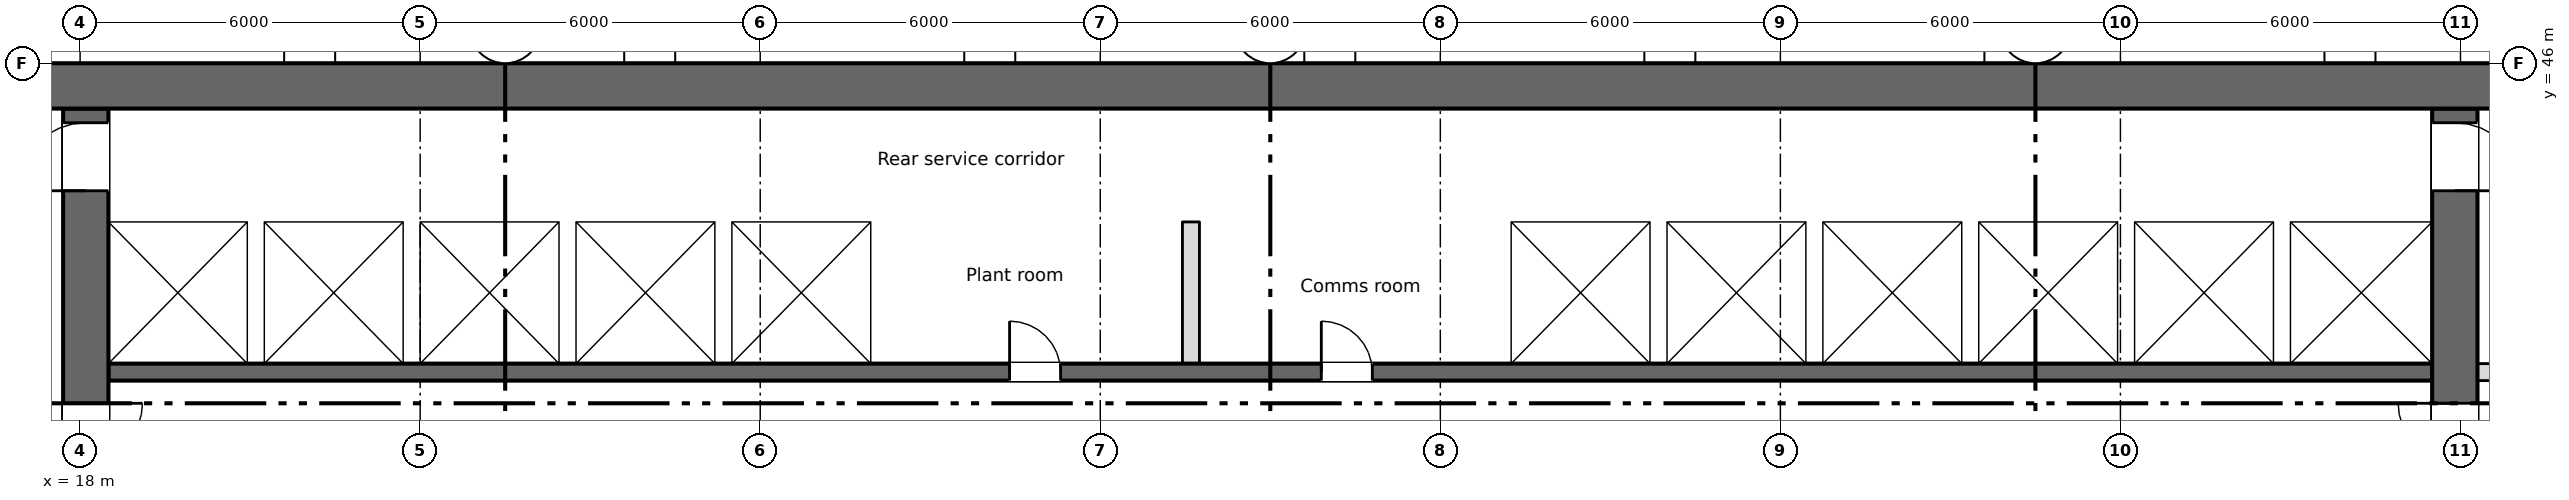
"""IFC4 building model, lengths in metres.
Left out: names, types, materials, properties, quantities, classifications, styles, units other than length and angle.
Written with IfcOpenShell. Run it as: python <this file> out.ifc"""

import sys

from ifc_helpers import new_model, si_unit, direction, frame, frame_2d, origin, place, context, subcontext, project, spatial, rectangle, extrude, element, fill, save


model = new_model("IFC4")
c1 = context("Model", 3, precision=1e-05, world=origin(), true_north=direction((0.0, 1.0)))
c2 = subcontext(c1, "Body", "Model", "MODEL_VIEW")
j1 = project(units=[si_unit("LENGTHUNIT", "METRE"), si_unit("PLANEANGLEUNIT", "RADIAN")], contexts=[c1])
p1 = place(None, origin())
s1 = spatial("IfcSite", under=j1, at=p1, CompositionType="ELEMENT")
p2 = place(p1, origin())
s2 = spatial("IfcBuilding", under=s1, at=p2, CompositionType="ELEMENT")
p3 = place(p2, frame((0.0, 0.0, 95.0)))
s3 = spatial("IfcBuildingStorey", under=s2, at=p3, CompositionType="ELEMENT", Elevation=95.0)
p4 = place(p3, frame((5.55, 45.6, 0.0), z_axis=(0.0, 0.0, 1.0), x_axis=(1.0, 0.0, 0.0)))
e1 = element("IfcWall", 1, at=p4, inside=s3, PredefinedType="SHEAR", context=c2, shape_type="SweptSolid", body=[
    extrude(rectangle(XDim=60.9, YDim=0.8, at=frame_2d((30.45, 0.0))), origin(), (0.0, 0.0, 1.0), 3.35),
])
p5 = place(p4, frame((1.2, 0.0, 0.6)))
e2 = element("IfcOpeningElement", 2, at=p5, cuts=e1, PredefinedType="OPENING", context=c2, shape_type="SweptSolid", body=[
    extrude(rectangle(XDim=0.6, YDim=2.4, at=frame_2d((0.3, 1.2))), frame((0.0, 0.41, 0.0), z_axis=(0.0, -1.0, 0.0), x_axis=(1.0, 0.0, 0.0)), (0.0, 0.0, 1.0), 0.82),
])
p6 = place(p4, frame((7.2, 0.0, 0.6)))
e3 = element("IfcOpeningElement", 3, at=p6, cuts=e1, PredefinedType="OPENING", context=c2, shape_type="SweptSolid", body=[
    extrude(rectangle(XDim=0.6, YDim=2.4, at=frame_2d((0.3, 1.2))), frame((0.0, 0.41, 0.0), z_axis=(0.0, -1.0, 0.0), x_axis=(1.0, 0.0, 0.0)), (0.0, 0.0, 1.0), 0.82),
])
p7 = place(p4, frame((55.2, 0.0, 0.6)))
e4 = element("IfcOpeningElement", 4, at=p7, cuts=e1, PredefinedType="OPENING", context=c2, shape_type="SweptSolid", body=[
    extrude(rectangle(XDim=0.6, YDim=2.4, at=frame_2d((0.3, 1.2))), frame((0.0, 0.41, 0.0), z_axis=(0.0, -1.0, 0.0), x_axis=(1.0, 0.0, 0.0)), (0.0, 0.0, 1.0), 0.82),
])
p8 = place(p3, frame((18.1, 28.4, 0.0), z_axis=(0.0, 0.0, 1.0), x_axis=(0.0, 1.0, 0.0)))
e5 = element("IfcWall", 5, at=p8, inside=s3, PredefinedType="SHEAR", context=c2, shape_type="SweptSolid", body=[
    extrude(rectangle(XDim=16.8, YDim=0.8, at=frame_2d((8.4, 0.0))), origin(), (0.0, 0.0, 1.0), 3.35),
])
p9 = place(p8, frame((9.6, 0.0, 0.0)))
e6 = element("IfcOpeningElement", 6, at=p9, cuts=e5, PredefinedType="OPENING", context=c2, shape_type="SweptSolid", body=[
    extrude(rectangle(XDim=2.0, YDim=2.1, at=frame_2d((1.0, 1.05))), frame((0.0, 0.41, 0.0), z_axis=(0.0, -1.0, 0.0), x_axis=(1.0, 0.0, 0.0)), (0.0, 0.0, 1.0), 0.82),
])
p10 = place(p8, frame((15.35, 0.0, 0.0)))
e7 = element("IfcOpeningElement", 7, at=p10, cuts=e5, PredefinedType="OPENING", context=c2, shape_type="SweptSolid", body=[
    extrude(rectangle(XDim=1.2, YDim=2.1, at=frame_2d((0.6, 1.05))), frame((0.0, 0.41, 0.0), z_axis=(0.0, -1.0, 0.0), x_axis=(1.0, 0.0, 0.0)), (0.0, 0.0, 1.0), 0.82),
])
p11 = place(p3, frame((59.9, 28.4, 0.0), z_axis=(0.0, 0.0, 1.0), x_axis=(0.0, 1.0, 0.0)))
e8 = element("IfcWall", 8, at=p11, inside=s3, PredefinedType="SHEAR", context=c2, shape_type="SweptSolid", body=[
    extrude(rectangle(XDim=16.8, YDim=0.8, at=frame_2d((8.4, 0.0))), origin(), (0.0, 0.0, 1.0), 3.35),
])
p12 = place(p11, frame((9.6, 0.0, 0.0)))
e9 = element("IfcOpeningElement", 9, at=p12, cuts=e8, PredefinedType="OPENING", context=c2, shape_type="SweptSolid", body=[
    extrude(rectangle(XDim=2.0, YDim=2.1, at=frame_2d((1.0, 1.05))), frame((0.0, 0.41, 0.0), z_axis=(0.0, -1.0, 0.0), x_axis=(1.0, 0.0, 0.0)), (0.0, 0.0, 1.0), 0.82),
])
p13 = place(p11, frame((15.35, 0.0, 0.0)))
e10 = element("IfcOpeningElement", 10, at=p13, cuts=e8, PredefinedType="OPENING", context=c2, shape_type="SweptSolid", body=[
    extrude(rectangle(XDim=1.2, YDim=2.1, at=frame_2d((0.6, 1.05))), frame((0.0, 0.41, 0.0), z_axis=(0.0, -1.0, 0.0), x_axis=(1.0, 0.0, 0.0)), (0.0, 0.0, 1.0), 0.82),
])
p14 = place(p3, frame((18.5, 40.55, 0.0), z_axis=(0.0, 0.0, 1.0), x_axis=(1.0, 0.0, 0.0)))
e11 = element("IfcWall", 11, at=p14, inside=s3, PredefinedType="SHEAR", context=c2, shape_type="SweptSolid", body=[
    extrude(rectangle(XDim=41.0, YDim=0.3, at=frame_2d((20.5, 0.0))), origin(), (0.0, 0.0, 1.0), 3.35),
])
p15 = place(p14, frame((15.9, 0.0, 0.0)))
e12 = element("IfcOpeningElement", 12, at=p15, cuts=e11, PredefinedType="OPENING", context=c2, shape_type="SweptSolid", body=[
    extrude(rectangle(XDim=0.9, YDim=2.1, at=frame_2d((0.45, 1.05))), frame((0.0, 0.16, 0.0), z_axis=(0.0, -1.0, 0.0), x_axis=(1.0, 0.0, 0.0)), (0.0, 0.0, 1.0), 0.32),
])
p16 = place(p14, frame((21.4, 0.0, 0.0)))
e13 = element("IfcOpeningElement", 13, at=p16, cuts=e11, PredefinedType="OPENING", context=c2, shape_type="SweptSolid", body=[
    extrude(rectangle(XDim=0.9, YDim=2.1, at=frame_2d((0.45, 1.05))), frame((0.0, 0.16, 0.0), z_axis=(0.0, -1.0, 0.0), x_axis=(1.0, 0.0, 0.0)), (0.0, 0.0, 1.0), 0.32),
])
p17 = place(p14, frame((6.175, 0.0, 0.0)))
e14 = element("IfcOpeningElement", 14, at=p17, cuts=e11, PredefinedType="OPENING", context=c2, shape_type="SweptSolid", body=[
    extrude(rectangle(XDim=1.1, YDim=2.1, at=frame_2d((0.55, 1.05))), frame((0.0, 0.16, 0.0), z_axis=(0.0, -1.0, 0.0), x_axis=(1.0, 0.0, 0.0)), (0.0, 0.0, 1.0), 0.32),
])
p18 = place(p14, frame((8.925, 0.0, 0.0)))
e15 = element("IfcOpeningElement", 15, at=p18, cuts=e11, PredefinedType="OPENING", context=c2, shape_type="SweptSolid", body=[
    extrude(rectangle(XDim=1.1, YDim=2.1, at=frame_2d((0.55, 1.05))), frame((0.0, 0.16, 0.0), z_axis=(0.0, -1.0, 0.0), x_axis=(1.0, 0.0, 0.0)), (0.0, 0.0, 1.0), 0.32),
])
p19 = place(p14, frame((11.675, 0.0, 0.0)))
e16 = element("IfcOpeningElement", 16, at=p19, cuts=e11, PredefinedType="OPENING", context=c2, shape_type="SweptSolid", body=[
    extrude(rectangle(XDim=1.1, YDim=2.1, at=frame_2d((0.55, 1.05))), frame((0.0, 0.16, 0.0), z_axis=(0.0, -1.0, 0.0), x_axis=(1.0, 0.0, 0.0)), (0.0, 0.0, 1.0), 0.32),
])
p20 = place(p14, frame((30.925, 0.0, 0.0)))
e17 = element("IfcOpeningElement", 17, at=p20, cuts=e11, PredefinedType="OPENING", context=c2, shape_type="SweptSolid", body=[
    extrude(rectangle(XDim=1.1, YDim=2.1, at=frame_2d((0.55, 1.05))), frame((0.0, 0.16, 0.0), z_axis=(0.0, -1.0, 0.0), x_axis=(1.0, 0.0, 0.0)), (0.0, 0.0, 1.0), 0.32),
])
p21 = place(p14, frame((33.675, 0.0, 0.0)))
e18 = element("IfcOpeningElement", 18, at=p21, cuts=e11, PredefinedType="OPENING", context=c2, shape_type="SweptSolid", body=[
    extrude(rectangle(XDim=1.1, YDim=2.1, at=frame_2d((0.55, 1.05))), frame((0.0, 0.16, 0.0), z_axis=(0.0, -1.0, 0.0), x_axis=(1.0, 0.0, 0.0)), (0.0, 0.0, 1.0), 0.32),
])
p22 = place(p14, frame((36.375, 0.0, 0.0)))
e19 = element("IfcOpeningElement", 19, at=p22, cuts=e11, PredefinedType="OPENING", context=c2, shape_type="SweptSolid", body=[
    extrude(rectangle(XDim=1.2, YDim=2.1, at=frame_2d((0.6, 1.05))), frame((0.0, 0.16, 0.0), z_axis=(0.0, -1.0, 0.0), x_axis=(1.0, 0.0, 0.0)), (0.0, 0.0, 1.0), 0.32),
])
p23 = place(p14, frame((39.15, 0.0, 0.0)))
e20 = element("IfcOpeningElement", 20, at=p23, cuts=e11, PredefinedType="OPENING", context=c2, shape_type="SweptSolid", body=[
    extrude(rectangle(XDim=1.2, YDim=2.1, at=frame_2d((0.6, 1.05))), frame((0.0, 0.16, 0.0), z_axis=(0.0, -1.0, 0.0), x_axis=(1.0, 0.0, 0.0)), (0.0, 0.0, 1.0), 0.32),
])
p24 = place(p3, frame((18.5, 43.35, 0.0), z_axis=(0.0, 0.0, 1.0), x_axis=(1.0, 0.0, 0.0)))
e21 = element("IfcWall", 21, at=p24, inside=s3, PredefinedType="SHEAR", context=c2, shape_type="SweptSolid", body=[
    extrude(rectangle(XDim=41.0, YDim=0.3, at=frame_2d((20.5, 0.0))), origin(), (0.0, 0.0, 1.0), 3.35),
])
p25 = place(p3, frame((60.3, 40.55, 0.0), z_axis=(0.0, 0.0, 1.0), x_axis=(1.0, 0.0, 0.0)))
e22 = element("IfcWall", 22, at=p25, inside=s3, PredefinedType="PARTITIONING", context=c2, shape_type="SweptSolid", body=[
    extrude(rectangle(XDim=2.4, YDim=0.3, at=frame_2d((1.2, 0.0))), origin(), (0.0, 0.0, 1.0), 3.35),
])
p26 = place(p25, frame((0.675, 0.0, 0.0)))
e23 = element("IfcOpeningElement", 23, at=p26, cuts=e22, PredefinedType="OPENING", context=c2, shape_type="SweptSolid", body=[
    extrude(rectangle(XDim=0.9, YDim=2.1, at=frame_2d((0.45, 1.05))), frame((0.0, 0.16, 0.0), z_axis=(0.0, -1.0, 0.0), x_axis=(1.0, 0.0, 0.0)), (0.0, 0.0, 1.0), 0.32),
])
for number, where, z_axis, x_axis in (
    (24, (21.1, 40.7, 0.0), (0.0, 0.0, 1.0), (0.0, 1.0, 0.0)),
    (25, (23.85, 40.7, 0.0), (0.0, 0.0, 1.0), (0.0, 1.0, 0.0)),
    (26, (26.6, 40.7, 0.0), (0.0, 0.0, 1.0), (0.0, 1.0, 0.0)),
    (27, (29.35, 40.7, 0.0), (0.0, 0.0, 1.0), (0.0, 1.0, 0.0)),
    (28, (32.1, 40.7, 0.0), (0.0, 0.0, 1.0), (0.0, 1.0, 0.0)),
    (29, (43.1, 40.7, 0.0), (0.0, 0.0, 1.0), (0.0, 1.0, 0.0)),
    (30, (45.85, 40.7, 0.0), (0.0, 0.0, 1.0), (0.0, 1.0, 0.0)),
    (31, (48.6, 40.7, 0.0), (0.0, 0.0, 1.0), (0.0, 1.0, 0.0)),
    (32, (51.35, 40.7, 0.0), (0.0, 0.0, 1.0), (0.0, 1.0, 0.0)),
    (33, (54.1, 40.7, 0.0), (0.0, 0.0, 1.0), (0.0, 1.0, 0.0)),
    (34, (56.85, 40.7, 0.0), (0.0, 0.0, 1.0), (0.0, 1.0, 0.0)),
):
    element("IfcWall", number, at=place(p3, frame(where, z_axis=z_axis, x_axis=x_axis)), inside=s3, PredefinedType="SHEAR", context=c2, shape_type="SweptSolid", body=[
        extrude(rectangle(XDim=2.5, YDim=0.3, at=frame_2d((1.25, 0.0))), origin(), (0.0, 0.0, 1.0), 3.35),
    ])
p27 = place(p3, frame((37.6, 40.7, 0.0), z_axis=(0.0, 0.0, 1.0), x_axis=(0.0, 1.0, 0.0)))
e35 = element("IfcWall", 35, at=p27, inside=s3, PredefinedType="PARTITIONING", context=c2, shape_type="SweptSolid", body=[
    extrude(rectangle(XDim=2.5, YDim=0.3, at=frame_2d((1.25, 0.0))), origin(), (0.0, 0.0, 1.0), 3.35),
])
p28 = place(p15, origin())
e36 = element("IfcDoor", 36, at=p28, inside=s3, OperationType="SINGLE_SWING_LEFT", PredefinedType="DOOR", context=c2, shape_type="SweptSolid", body=[
    extrude(rectangle(XDim=0.9, YDim=2.1, at=frame_2d((0.45, 1.05))), frame((0.0, 0.025, 0.0), z_axis=(0.0, -1.0, 0.0), x_axis=(1.0, 0.0, 0.0)), (0.0, 0.0, 1.0), 0.05),
])
fill(e12, e36)
p29 = place(p16, origin())
e37 = element("IfcDoor", 37, at=p29, inside=s3, OperationType="SINGLE_SWING_LEFT", PredefinedType="DOOR", context=c2, shape_type="SweptSolid", body=[
    extrude(rectangle(XDim=0.9, YDim=2.1, at=frame_2d((0.45, 1.05))), frame((0.0, 0.025, 0.0), z_axis=(0.0, -1.0, 0.0), x_axis=(1.0, 0.0, 0.0)), (0.0, 0.0, 1.0), 0.05),
])
fill(e13, e37)
p30 = place(p17, origin())
e38 = element("IfcDoor", 38, at=p30, inside=s3, OperationType="SLIDING_TO_LEFT", PredefinedType="DOOR", context=c2, shape_type="SweptSolid", body=[
    extrude(rectangle(XDim=1.1, YDim=2.1, at=frame_2d((0.55, 1.05))), frame((0.0, 0.025, 0.0), z_axis=(0.0, -1.0, 0.0), x_axis=(1.0, 0.0, 0.0)), (0.0, 0.0, 1.0), 0.05),
])
fill(e14, e38)
p31 = place(p18, origin())
e39 = element("IfcDoor", 39, at=p31, inside=s3, OperationType="SLIDING_TO_LEFT", PredefinedType="DOOR", context=c2, shape_type="SweptSolid", body=[
    extrude(rectangle(XDim=1.1, YDim=2.1, at=frame_2d((0.55, 1.05))), frame((0.0, 0.025, 0.0), z_axis=(0.0, -1.0, 0.0), x_axis=(1.0, 0.0, 0.0)), (0.0, 0.0, 1.0), 0.05),
])
fill(e15, e39)
p32 = place(p19, origin())
e40 = element("IfcDoor", 40, at=p32, inside=s3, OperationType="SLIDING_TO_LEFT", PredefinedType="DOOR", context=c2, shape_type="SweptSolid", body=[
    extrude(rectangle(XDim=1.1, YDim=2.1, at=frame_2d((0.55, 1.05))), frame((0.0, 0.025, 0.0), z_axis=(0.0, -1.0, 0.0), x_axis=(1.0, 0.0, 0.0)), (0.0, 0.0, 1.0), 0.05),
])
fill(e16, e40)
p33 = place(p20, origin())
e41 = element("IfcDoor", 41, at=p33, inside=s3, OperationType="SLIDING_TO_LEFT", PredefinedType="DOOR", context=c2, shape_type="SweptSolid", body=[
    extrude(rectangle(XDim=1.1, YDim=2.1, at=frame_2d((0.55, 1.05))), frame((0.0, 0.025, 0.0), z_axis=(0.0, -1.0, 0.0), x_axis=(1.0, 0.0, 0.0)), (0.0, 0.0, 1.0), 0.05),
])
fill(e17, e41)
p34 = place(p21, origin())
e42 = element("IfcDoor", 42, at=p34, inside=s3, OperationType="SLIDING_TO_LEFT", PredefinedType="DOOR", context=c2, shape_type="SweptSolid", body=[
    extrude(rectangle(XDim=1.1, YDim=2.1, at=frame_2d((0.55, 1.05))), frame((0.0, 0.025, 0.0), z_axis=(0.0, -1.0, 0.0), x_axis=(1.0, 0.0, 0.0)), (0.0, 0.0, 1.0), 0.05),
])
fill(e18, e42)
p35 = place(p22, origin())
e43 = element("IfcDoor", 43, at=p35, inside=s3, OperationType="SLIDING_TO_LEFT", PredefinedType="DOOR", context=c2, shape_type="SweptSolid", body=[
    extrude(rectangle(XDim=1.2, YDim=2.1, at=frame_2d((0.6, 1.05))), frame((0.0, 0.025, 0.0), z_axis=(0.0, -1.0, 0.0), x_axis=(1.0, 0.0, 0.0)), (0.0, 0.0, 1.0), 0.05),
])
fill(e19, e43)
p36 = place(p23, origin())
e44 = element("IfcDoor", 44, at=p36, inside=s3, OperationType="SLIDING_TO_LEFT", PredefinedType="DOOR", context=c2, shape_type="SweptSolid", body=[
    extrude(rectangle(XDim=1.2, YDim=2.1, at=frame_2d((0.6, 1.05))), frame((0.0, 0.025, 0.0), z_axis=(0.0, -1.0, 0.0), x_axis=(1.0, 0.0, 0.0)), (0.0, 0.0, 1.0), 0.05),
])
fill(e20, e44)
p37 = place(p9, origin())
e45 = element("IfcDoor", 45, at=p37, inside=s3, OperationType="DOUBLE_DOOR_SINGLE_SWING", PredefinedType="DOOR", context=c2, shape_type="SweptSolid", body=[
    extrude(rectangle(XDim=2.0, YDim=2.1, at=frame_2d((1.0, 1.05))), frame((0.0, 0.025, 0.0), z_axis=(0.0, -1.0, 0.0), x_axis=(1.0, 0.0, 0.0)), (0.0, 0.0, 1.0), 0.05),
])
fill(e6, e45)
p38 = place(p12, origin())
e46 = element("IfcDoor", 46, at=p38, inside=s3, OperationType="DOUBLE_DOOR_SINGLE_SWING", PredefinedType="DOOR", context=c2, shape_type="SweptSolid", body=[
    extrude(rectangle(XDim=2.0, YDim=2.1, at=frame_2d((1.0, 1.05))), frame((0.0, 0.025, 0.0), z_axis=(0.0, -1.0, 0.0), x_axis=(1.0, 0.0, 0.0)), (0.0, 0.0, 1.0), 0.05),
])
fill(e9, e46)
p39 = place(p10, origin())
e47 = element("IfcDoor", 47, at=p39, inside=s3, OperationType="SINGLE_SWING_LEFT", PredefinedType="DOOR", context=c2, shape_type="SweptSolid", body=[
    extrude(rectangle(XDim=1.2, YDim=2.1, at=frame_2d((0.6, 1.05))), frame((0.0, 0.025, 0.0), z_axis=(0.0, -1.0, 0.0), x_axis=(1.0, 0.0, 0.0)), (0.0, 0.0, 1.0), 0.05),
])
fill(e7, e47)
p40 = place(p13, origin())
e48 = element("IfcDoor", 48, at=p40, inside=s3, OperationType="SINGLE_SWING_LEFT", PredefinedType="DOOR", context=c2, shape_type="SweptSolid", body=[
    extrude(rectangle(XDim=1.2, YDim=2.1, at=frame_2d((0.6, 1.05))), frame((0.0, 0.025, 0.0), z_axis=(0.0, -1.0, 0.0), x_axis=(1.0, 0.0, 0.0)), (0.0, 0.0, 1.0), 0.05),
])
fill(e10, e48)
save(model, sys.argv[1])
